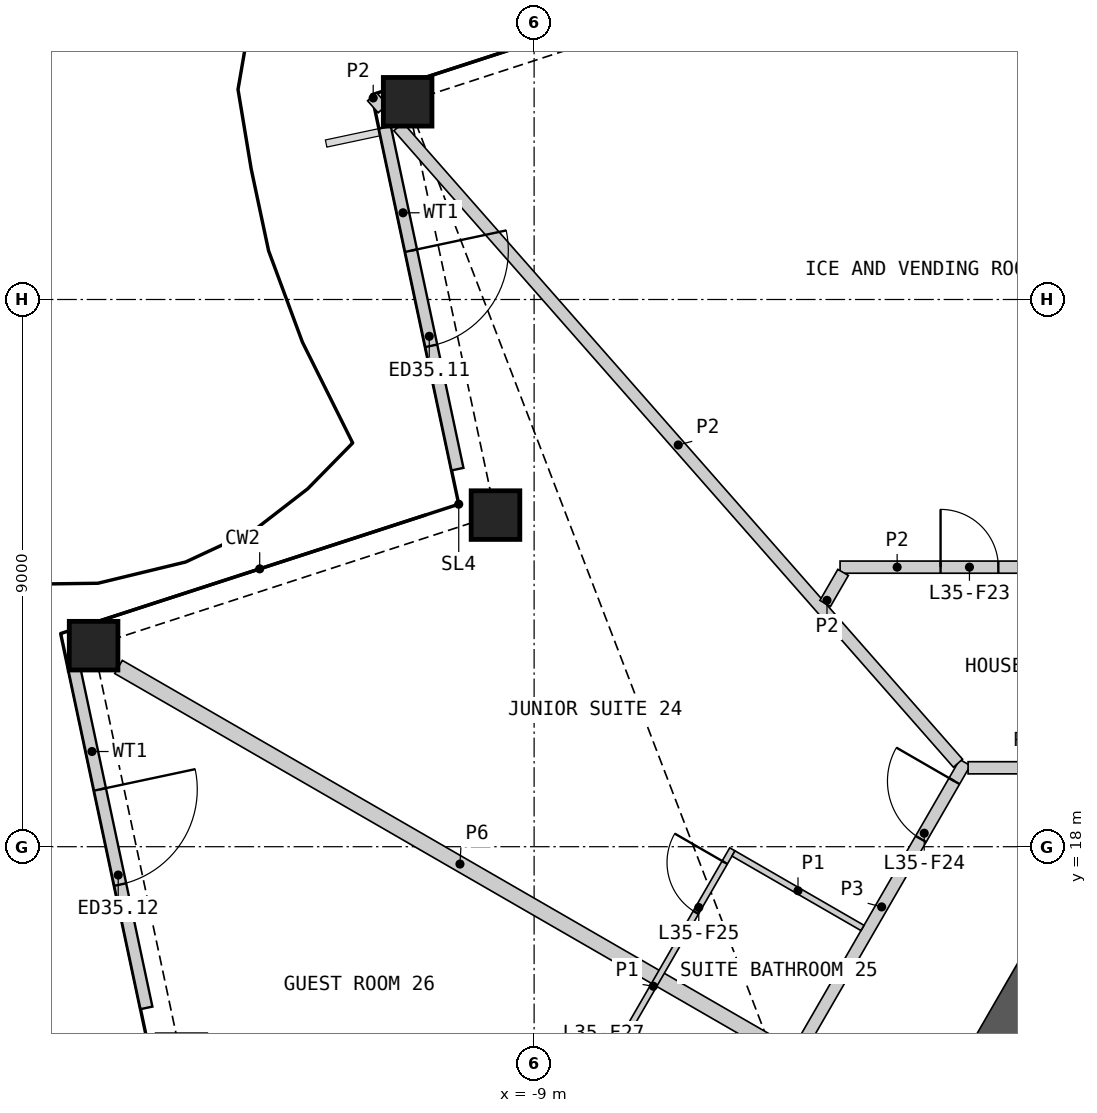
"""IFC4 building model, lengths in metres.
Left out: names, types, materials, properties, quantities, classifications, styles, units other than length and angle.
Written with IfcOpenShell. Run it as: python <this file> out.ifc"""

import sys

from ifc_helpers import new_model, si_unit, direction, frame, frame_2d, origin, origin_2d, place, context, subcontext, project, spatial, rectangle, hollow_rectangle, extrude, element, fill, save


model = new_model("IFC4")
c1 = context("Model", 3, precision=1e-05, world=origin(), true_north=direction((0.0, 1.0)))
c2 = subcontext(c1, "Body", "Model", "MODEL_VIEW")
j1 = project(units=[si_unit("LENGTHUNIT", "METRE"), si_unit("PLANEANGLEUNIT", "RADIAN")], contexts=[c1])
p1 = place(None, origin())
s1 = spatial("IfcSite", under=j1, at=p1, CompositionType="ELEMENT")
p2 = place(p1, origin())
s2 = spatial("IfcBuilding", under=s1, at=p2, CompositionType="ELEMENT")
p3 = place(p2, frame((0.0, 0.0, 169.2)))
s3 = spatial("IfcBuildingStorey", under=s2, at=p3, CompositionType="ELEMENT", Elevation=169.2)
for number, where, z_axis, x_axis in (
    (1, (-11.08, 30.252, 0.0), (0.0, 0.0, 1.0), (1.0, 0.0, 0.0)),
    (2, (-9.635, 23.454, 0.0), (0.0, 0.0, 1.0), (1.0, 0.0, 0.0)),
    (3, (-16.245, 21.306, 0.0), (0.0, 0.0, 1.0), (1.0, 0.0, 0.0)),
):
    element("IfcColumn", number, at=place(p3, frame(where, z_axis=z_axis, x_axis=x_axis)), inside=s3, PredefinedType="COLUMN", context=c2, shape_type="SweptSolid", body=[
        extrude(hollow_rectangle(XDim=0.8, YDim=0.8, WallThickness=0.05, at=origin_2d()), origin(), (0.0, 0.0, 1.0), 3.6),
    ])
p4 = place(p3, frame((-11.455, 29.832, 0.0), z_axis=(0.0, 0.0, 1.0), x_axis=(0.207913110781, -0.97814729891, 0.0)))
e4 = element("IfcWall", 4, at=p4, inside=s3, PredefinedType="SOLIDWALL", context=c2, shape_type="SweptSolid", body=[
    extrude(rectangle(XDim=5.748, YDim=0.2, at=frame_2d((2.874, 0.0))), origin(), (0.0, 0.0, 1.0), 2.701),
])
p5 = place(p4, frame((2.074, 0.0, 0.0)))
e5 = element("IfcOpeningElement", 5, at=p5, cuts=e4, PredefinedType="OPENING", context=c2, shape_type="SweptSolid", body=[
    extrude(rectangle(XDim=1.6, YDim=2.4, at=frame_2d((0.8, 1.2))), frame((0.0, 0.11, 0.0), z_axis=(0.0, -1.0, 0.0), x_axis=(1.0, 0.0, 0.0)), (0.0, 0.0, 1.0), 0.22),
])
p6 = place(p3, frame((-16.571, 20.971, 0.0), z_axis=(0.0, 0.0, 1.0), x_axis=(0.207872471739, -0.978155936184, 0.0)))
e6 = element("IfcWall", 6, at=p6, inside=s3, PredefinedType="SOLIDWALL", context=c2, shape_type="SweptSolid", body=[
    extrude(rectangle(XDim=5.748, YDim=0.2, at=frame_2d((2.874, 0.0))), origin(), (0.0, 0.0, 1.0), 2.701),
])
p7 = place(p6, frame((2.074, 0.0, 0.0)))
e7 = element("IfcOpeningElement", 7, at=p7, cuts=e6, PredefinedType="OPENING", context=c2, shape_type="SweptSolid", body=[
    extrude(rectangle(XDim=1.6, YDim=2.4, at=frame_2d((0.8, 1.2))), frame((0.0, 0.11, 0.0), z_axis=(0.0, -1.0, 0.0), x_axis=(1.0, 0.0, 0.0)), (0.0, 0.0, 1.0), 0.22),
])
p8 = place(p3, frame((-0.325, 16.585, 0.0), z_axis=(0.0, 0.0, 1.0), x_axis=(-0.499993425452, -0.866029199568, 0.0)))
e8 = element("IfcWall", 8, at=p8, inside=s3, PredefinedType="SHEAR", context=c2, shape_type="SweptSolid", body=[
    extrude(rectangle(XDim=6.785, YDim=0.75, at=frame_2d((3.393, 0.0))), origin(), (0.0, 0.0, 1.0), 3.25),
])
p9 = place(p3, frame((-15.835, 20.956, 0.0), z_axis=(0.0, 0.0, 1.0), x_axis=(0.866029765546, -0.499992445131, 0.0)))
e9 = element("IfcWall", 9, at=p9, inside=s3, PredefinedType="PARTITIONING", context=c2, shape_type="SweptSolid", body=[
    extrude(rectangle(XDim=12.968, YDim=0.25, at=frame_2d((6.484, 0.0))), origin(), (0.0, 0.0, 1.0), 2.404),
])
p10 = place(p3, frame((-4.655, 14.635, 0.0), z_axis=(0.0, 0.0, 1.0), x_axis=(0.499988331988, 0.866032140209, 0.0)))
e10 = element("IfcWall", 10, at=p10, inside=s3, PredefinedType="PARTITIONING", context=c2, shape_type="SweptSolid", body=[
    extrude(rectangle(XDim=5.485, YDim=0.2, at=frame_2d((2.742, 0.0))), origin(), (0.0, 0.0, 1.0), 3.25),
])
p11 = place(p10, frame((4.032, 0.0, 0.0)))
e11 = element("IfcOpeningElement", 11, at=p11, cuts=e10, PredefinedType="OPENING", context=c2, shape_type="SweptSolid", body=[
    extrude(rectangle(XDim=1.1, YDim=2.1, at=frame_2d((0.55, 1.05))), frame((0.0, 0.11, 0.0), z_axis=(0.0, -1.0, 0.0), x_axis=(1.0, 0.0, 0.0)), (0.0, 0.0, 1.0), 0.22),
])
p12 = place(p3, frame((-1.863, 19.298, 0.0), z_axis=(0.0, 0.0, 1.0), x_axis=(1.0, 0.0, 0.0)))
e12 = element("IfcWall", 12, at=p12, inside=s3, PredefinedType="PARTITIONING", context=c2, shape_type="SweptSolid", body=[
    extrude(rectangle(XDim=3.726, YDim=0.2, at=frame_2d((1.863, 0.0))), origin(), (0.0, 0.0, 1.0), 3.25),
])
p13 = place(p12, frame((1.388, 0.0, 0.0)))
e13 = element("IfcOpeningElement", 13, at=p13, cuts=e12, PredefinedType="OPENING", context=c2, shape_type="SweptSolid", body=[
    extrude(rectangle(XDim=0.95, YDim=2.1, at=frame_2d((0.475, 1.05))), frame((0.0, 0.11, 0.0), z_axis=(0.0, -1.0, 0.0), x_axis=(1.0, 0.0, 0.0)), (0.0, 0.0, 1.0), 0.22),
])
p14 = place(p3, frame((-11.231, 29.842, 0.0), z_axis=(0.0, 0.0, 1.0), x_axis=(0.66019067586, -0.751098043871, 0.0)))
e14 = element("IfcWall", 14, at=p14, inside=s3, PredefinedType="PARTITIONING", context=c2, shape_type="SweptSolid", body=[
    extrude(rectangle(XDim=13.938, YDim=0.2, at=frame_2d((6.969, 0.0))), origin(), (0.0, 0.0, 1.0), 2.404),
])
p15 = place(p3, frame((-3.968, 22.598, 0.0), z_axis=(0.0, 0.0, 1.0), x_axis=(1.0, 0.0, 0.0)))
e15 = element("IfcWall", 15, at=p15, inside=s3, PredefinedType="PARTITIONING", context=c2, shape_type="SweptSolid", body=[
    extrude(rectangle(XDim=3.755, YDim=0.2, at=frame_2d((1.877, 0.0))), origin(), (0.0, 0.0, 1.0), 2.404),
])
p16 = place(p15, frame((1.653, 0.0, 0.0)))
e16 = element("IfcOpeningElement", 16, at=p16, cuts=e15, PredefinedType="OPENING", context=c2, shape_type="SweptSolid", body=[
    extrude(rectangle(XDim=0.95, YDim=2.1, at=frame_2d((0.475, 1.05))), frame((0.0, 0.11, 0.0), z_axis=(0.0, -1.0, 0.0), x_axis=(1.0, 0.0, 0.0)), (0.0, 0.0, 1.0), 0.22),
])
p17 = place(p3, frame((-4.213, 22.001, 0.0), z_axis=(0.0, 0.0, 1.0), x_axis=(0.500105011351, 0.865964766963, 0.0)))
e17 = element("IfcWall", 17, at=p17, inside=s3, PredefinedType="PARTITIONING", context=c2, shape_type="SweptSolid", body=[
    extrude(rectangle(XDim=0.589, YDim=0.2, at=frame_2d((0.294, 0.0))), origin(), (0.0, 0.0, 1.0), 2.404),
])
p18 = place(p3, frame((-11.664, 30.335, 0.0), z_axis=(0.0, 0.0, 1.0), x_axis=(0.660272933047, -0.751025734503, 0.0)))
e18 = element("IfcWall", 18, at=p18, inside=s3, PredefinedType="PARTITIONING", context=c2, shape_type="SweptSolid", body=[
    extrude(rectangle(XDim=0.264, YDim=0.2, at=frame_2d((0.132, 0.0))), origin(), (0.0, 0.0, 1.0), 2.404),
])
p19 = place(p3, frame((-8.339, 13.454, 0.0), z_axis=(0.0, 0.0, 1.0), x_axis=(0.499992051641, 0.866029992723, 0.0)))
e19 = element("IfcWall", 19, at=p19, inside=s3, PredefinedType="PARTITIONING", context=c2, shape_type="SweptSolid", body=[
    extrude(rectangle(XDim=5.2, YDim=0.1, at=frame_2d((2.6, 0.0))), origin(), (0.0, 0.0, 1.0), 2.404),
])
p20 = place(p19, frame((4.0, 0.0, 0.0)))
e20 = element("IfcOpeningElement", 20, at=p20, cuts=e19, PredefinedType="OPENING", context=c2, shape_type="SweptSolid", body=[
    extrude(rectangle(XDim=0.95, YDim=2.1, at=frame_2d((0.475, 1.05))), frame((0.0, 0.06, 0.0), z_axis=(0.0, -1.0, 0.0), x_axis=(1.0, 0.0, 0.0)), (0.0, 0.0, 1.0), 0.12),
])
p21 = place(p19, frame((0.25, 0.0, 0.0)))
e21 = element("IfcOpeningElement", 21, at=p21, cuts=e19, PredefinedType="OPENING", context=c2, shape_type="SweptSolid", body=[
    extrude(rectangle(XDim=0.95, YDim=2.1, at=frame_2d((0.475, 1.05))), frame((0.0, 0.06, 0.0), z_axis=(0.0, -1.0, 0.0), x_axis=(1.0, 0.0, 0.0)), (0.0, 0.0, 1.0), 0.12),
])
p22 = place(p3, frame((-5.721, 17.889, 0.0), z_axis=(0.0, 0.0, 1.0), x_axis=(0.866014668023, -0.500018594424, 0.0)))
e22 = element("IfcWall", 22, at=p22, inside=s3, PredefinedType="PARTITIONING", context=c2, shape_type="SweptSolid", body=[
    extrude(rectangle(XDim=2.45, YDim=0.1, at=frame_2d((1.225, 0.0))), origin(), (0.0, 0.0, 1.0), 2.404),
])
p23 = place(p5, origin())
e23 = element("IfcDoor", 23, at=p23, inside=s3, OperationType="DOUBLE_DOOR_SINGLE_SWING", PredefinedType="DOOR", context=c2, shape_type="SweptSolid", body=[
    extrude(rectangle(XDim=1.6, YDim=2.4, at=frame_2d((0.8, 1.2))), frame((0.0, 0.025, 0.0), z_axis=(0.0, -1.0, 0.0), x_axis=(1.0, 0.0, 0.0)), (0.0, 0.0, 1.0), 0.05),
])
fill(e5, e23)
p24 = place(p7, origin())
e24 = element("IfcDoor", 24, at=p24, inside=s3, OperationType="DOUBLE_DOOR_SINGLE_SWING", PredefinedType="DOOR", context=c2, shape_type="SweptSolid", body=[
    extrude(rectangle(XDim=1.6, YDim=2.4, at=frame_2d((0.8, 1.2))), frame((0.0, 0.025, 0.0), z_axis=(0.0, -1.0, 0.0), x_axis=(1.0, 0.0, 0.0)), (0.0, 0.0, 1.0), 0.05),
])
fill(e7, e24)
p25 = place(p16, origin())
e25 = element("IfcDoor", 25, at=p25, inside=s3, OperationType="SINGLE_SWING_LEFT", PredefinedType="DOOR", context=c2, shape_type="SweptSolid", body=[
    extrude(rectangle(XDim=0.95, YDim=2.1, at=frame_2d((0.475, 1.05))), frame((0.0, 0.025, 0.0), z_axis=(0.0, -1.0, 0.0), x_axis=(1.0, 0.0, 0.0)), (0.0, 0.0, 1.0), 0.05),
])
fill(e16, e25)
p26 = place(p11, origin())
e26 = element("IfcDoor", 26, at=p26, inside=s3, OperationType="SINGLE_SWING_RIGHT", PredefinedType="DOOR", context=c2, shape_type="SweptSolid", body=[
    extrude(rectangle(XDim=1.1, YDim=2.1, at=frame_2d((0.55, 1.05))), frame((0.0, 0.025, 0.0), z_axis=(0.0, -1.0, 0.0), x_axis=(1.0, 0.0, 0.0)), (0.0, 0.0, 1.0), 0.05),
])
fill(e11, e26)
p27 = place(p20, origin())
e27 = element("IfcDoor", 27, at=p27, inside=s3, OperationType="SINGLE_SWING_RIGHT", PredefinedType="DOOR", context=c2, shape_type="SweptSolid", body=[
    extrude(rectangle(XDim=0.95, YDim=2.1, at=frame_2d((0.475, 1.05))), frame((0.0, 0.025, 0.0), z_axis=(0.0, -1.0, 0.0), x_axis=(1.0, 0.0, 0.0)), (0.0, 0.0, 1.0), 0.05),
])
fill(e20, e27)
save(model, sys.argv[1])
